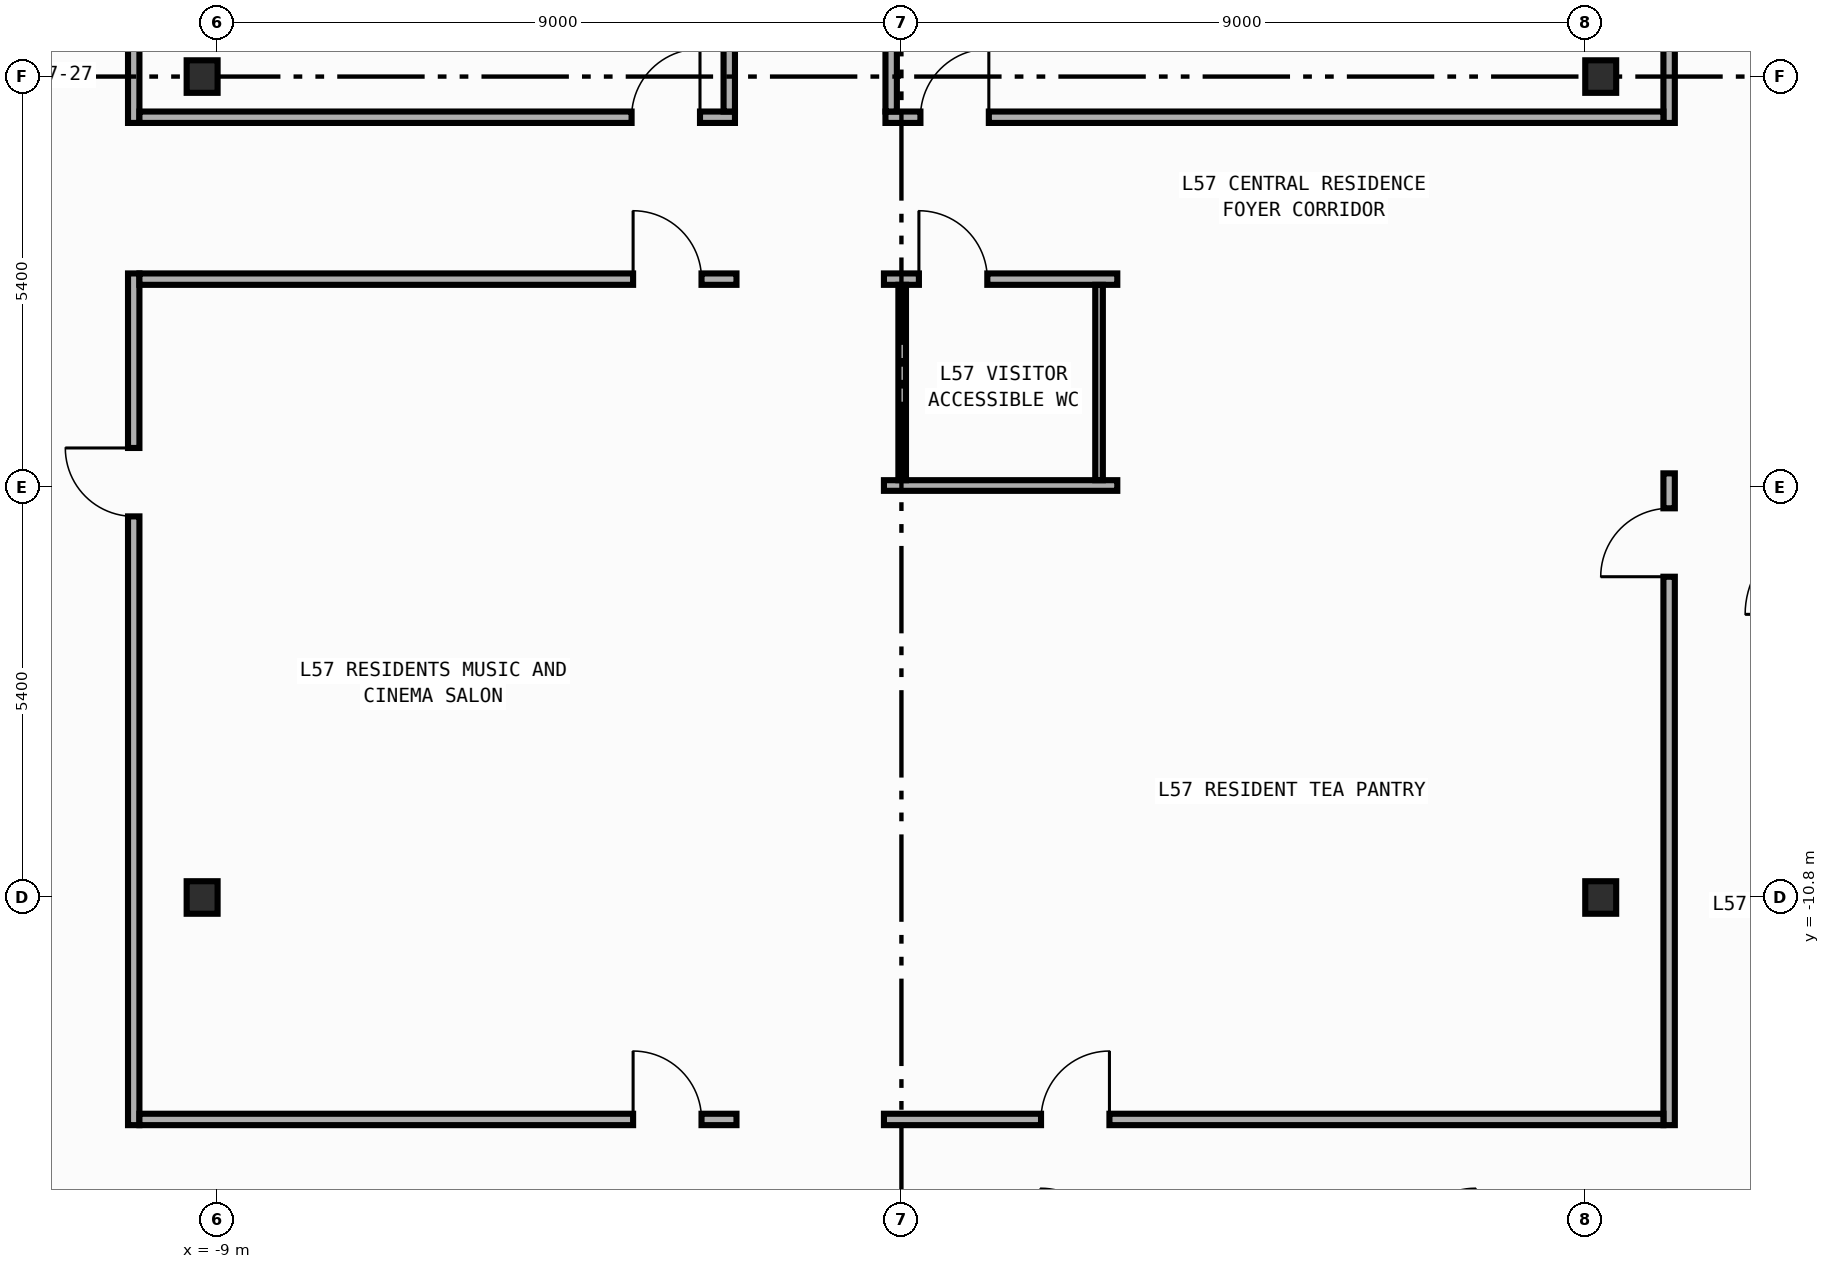
"""IFC4 building model, lengths in metres.
Left out: names, types, materials, properties, quantities, classifications, styles, units other than length and angle.
Written with IfcOpenShell. Run it as: python <this file> out.ifc"""

import sys

from ifc_helpers import new_model, si_unit, direction, frame, frame_2d, origin, origin_2d, place, context, subcontext, project, spatial, rectangle, i_section, extrude, element, fill, save


model = new_model("IFC4")
c1 = context("Model", 3, precision=1e-05, world=origin(), true_north=direction((0.0, 1.0)))
c2 = subcontext(c1, "Body", "Model", "MODEL_VIEW")
j1 = project(units=[si_unit("LENGTHUNIT", "METRE"), si_unit("PLANEANGLEUNIT", "RADIAN")], contexts=[c1])
p1 = place(None, origin())
s1 = spatial("IfcSite", under=j1, at=p1, CompositionType="ELEMENT")
p2 = place(p1, origin())
s2 = spatial("IfcBuilding", under=s1, at=p2, CompositionType="ELEMENT")
p3 = place(p2, frame((0.0, 0.0, 244.0)))
s3 = spatial("IfcBuildingStorey", under=s2, at=p3, CompositionType="ELEMENT", Elevation=244.0)
for number, where, z_axis, x_axis in (
    (1, (-9.2, -10.8, 0.0), (0.0, 0.0, 1.0), (1.0, 0.0, 0.0)),
    (2, (-9.2, 0.0, 0.0), (0.0, 0.0, 1.0), (1.0, 0.0, 0.0)),
    (3, (9.2, -10.8, 0.0), (0.0, 0.0, 1.0), (1.0, 0.0, 0.0)),
    (4, (9.2, 0.0, 0.0), (0.0, 0.0, 1.0), (1.0, 0.0, 0.0)),
):
    element("IfcColumn", number, at=place(p3, frame(where, z_axis=z_axis, x_axis=x_axis)), inside=s3, PredefinedType="COLUMN", context=c2, shape_type="SweptSolid", body=[
        extrude(i_section(OverallWidth=0.407, OverallDepth=0.428, WebThickness=0.02, FlangeThickness=0.035, FilletRadius=0.022, at=origin_2d()), origin(), (0.0, 0.0, 1.0), 3.6),
    ])
p4 = place(p3, frame((-10.1, -0.61, 0.0), z_axis=(0.0, 0.0, 1.0), x_axis=(0.0, 1.0, 0.0)))
e5 = element("IfcWall", 5, at=p4, inside=s3, PredefinedType="PARTITIONING", context=c2, shape_type="SweptSolid", body=[
    extrude(rectangle(XDim=14.405, YDim=0.15, at=frame_2d((7.203, 0.0))), origin(), (0.0, 0.0, 1.0), 3.34),
])
p5 = place(p4, frame((5.535, 0.0, 0.0)))
e6 = element("IfcOpeningElement", 6, at=p5, cuts=e5, PredefinedType="OPENING", context=c2, shape_type="SweptSolid", body=[
    extrude(rectangle(XDim=0.9, YDim=2.15, at=frame_2d((0.45, 1.075))), frame((0.0, 0.085, 0.0), z_axis=(0.0, -1.0, 0.0), x_axis=(1.0, 0.0, 0.0)), (0.0, 0.0, 1.0), 0.17),
])
p6 = place(p3, frame((-10.1, -13.795, 0.0), z_axis=(0.0, 0.0, 1.0), x_axis=(0.0, 1.0, 0.0)))
e7 = element("IfcWall", 7, at=p6, inside=s3, PredefinedType="PARTITIONING", context=c2, shape_type="SweptSolid", body=[
    extrude(rectangle(XDim=11.205, YDim=0.15, at=frame_2d((5.603, 0.0))), origin(), (0.0, 0.0, 1.0), 3.34),
])
p7 = place(p6, frame((8.009, 0.0, 0.0)))
e8 = element("IfcOpeningElement", 8, at=p7, cuts=e7, PredefinedType="OPENING", context=c2, shape_type="SweptSolid", body=[
    extrude(rectangle(XDim=0.9, YDim=2.15, at=frame_2d((0.45, 1.075))), frame((0.0, 0.085, 0.0), z_axis=(0.0, -1.0, 0.0), x_axis=(1.0, 0.0, 0.0)), (0.0, 0.0, 1.0), 0.17),
])
p8 = place(p3, frame((10.1, -0.61, 0.0), z_axis=(0.0, 0.0, 1.0), x_axis=(0.0, 1.0, 0.0)))
e9 = element("IfcWall", 9, at=p8, inside=s3, PredefinedType="PARTITIONING", context=c2, shape_type="SweptSolid", body=[
    extrude(rectangle(XDim=14.405, YDim=0.15, at=frame_2d((7.203, 0.0))), origin(), (0.0, 0.0, 1.0), 3.34),
])
p9 = place(p8, frame((5.535, 0.0, 0.0)))
e10 = element("IfcOpeningElement", 10, at=p9, cuts=e9, PredefinedType="OPENING", context=c2, shape_type="SweptSolid", body=[
    extrude(rectangle(XDim=0.9, YDim=2.15, at=frame_2d((0.45, 1.075))), frame((0.0, 0.085, 0.0), z_axis=(0.0, -1.0, 0.0), x_axis=(1.0, 0.0, 0.0)), (0.0, 0.0, 1.0), 0.17),
])
p10 = place(p3, frame((10.1, -13.795, 0.0), z_axis=(0.0, 0.0, 1.0), x_axis=(0.0, 1.0, 0.0)))
e11 = element("IfcWall", 11, at=p10, inside=s3, PredefinedType="PARTITIONING", context=c2, shape_type="SweptSolid", body=[
    extrude(rectangle(XDim=8.575, YDim=0.15, at=frame_2d((4.288, 0.0))), origin(), (0.0, 0.0, 1.0), 3.34),
])
p11 = place(p10, frame((7.215, 0.0, 0.0)))
e12 = element("IfcOpeningElement", 12, at=p11, cuts=e11, PredefinedType="OPENING", context=c2, shape_type="SweptSolid", body=[
    extrude(rectangle(XDim=0.9, YDim=2.15, at=frame_2d((0.45, 1.075))), frame((0.0, 0.085, 0.0), z_axis=(0.0, -1.0, 0.0), x_axis=(1.0, 0.0, 0.0)), (0.0, 0.0, 1.0), 0.17),
])
p12 = place(p3, frame((-10.025, -0.535, 0.0), z_axis=(0.0, 0.0, 1.0), x_axis=(1.0, 0.0, 0.0)))
e13 = element("IfcWall", 13, at=p12, inside=s3, PredefinedType="PARTITIONING", context=c2, shape_type="SweptSolid", body=[
    extrude(rectangle(XDim=7.835, YDim=0.15, at=frame_2d((3.917, 0.0))), origin(), (0.0, 0.0, 1.0), 3.34),
])
p13 = place(p12, frame((6.475, 0.0, 0.0)))
e14 = element("IfcOpeningElement", 14, at=p13, cuts=e13, PredefinedType="OPENING", context=c2, shape_type="SweptSolid", body=[
    extrude(rectangle(XDim=0.9, YDim=2.15, at=frame_2d((0.45, 1.075))), frame((0.0, 0.085, 0.0), z_axis=(0.0, -1.0, 0.0), x_axis=(1.0, 0.0, 0.0)), (0.0, 0.0, 1.0), 0.17),
])
p14 = place(p3, frame((-10.025, -2.665, 0.0), z_axis=(0.0, 0.0, 1.0), x_axis=(1.0, 0.0, 0.0)))
e15 = element("IfcWall", 15, at=p14, inside=s3, PredefinedType="PARTITIONING", context=c2, shape_type="SweptSolid", body=[
    extrude(rectangle(XDim=7.855, YDim=0.15, at=frame_2d((3.927, 0.0))), origin(), (0.0, 0.0, 1.0), 3.34),
])
p15 = place(p14, frame((6.495, 0.0, 0.0)))
e16 = element("IfcOpeningElement", 16, at=p15, cuts=e15, PredefinedType="OPENING", context=c2, shape_type="SweptSolid", body=[
    extrude(rectangle(XDim=0.9, YDim=2.15, at=frame_2d((0.45, 1.075))), frame((0.0, 0.085, 0.0), z_axis=(0.0, -1.0, 0.0), x_axis=(1.0, 0.0, 0.0)), (0.0, 0.0, 1.0), 0.17),
])
p16 = place(p3, frame((-0.21, -0.535, 0.0), z_axis=(0.0, 0.0, 1.0), x_axis=(1.0, 0.0, 0.0)))
e17 = element("IfcWall", 17, at=p16, inside=s3, PredefinedType="PARTITIONING", context=c2, shape_type="SweptSolid", body=[
    extrude(rectangle(XDim=10.235, YDim=0.15, at=frame_2d((5.117, 0.0))), origin(), (0.0, 0.0, 1.0), 3.34),
])
p17 = place(p16, frame((0.46, 0.0, 0.0)))
e18 = element("IfcOpeningElement", 18, at=p17, cuts=e17, PredefinedType="OPENING", context=c2, shape_type="SweptSolid", body=[
    extrude(rectangle(XDim=0.9, YDim=2.15, at=frame_2d((0.45, 1.075))), frame((0.0, 0.085, 0.0), z_axis=(0.0, -1.0, 0.0), x_axis=(1.0, 0.0, 0.0)), (0.0, 0.0, 1.0), 0.17),
])
p18 = place(p3, frame((-0.23, -2.665, 0.0), z_axis=(0.0, 0.0, 1.0), x_axis=(1.0, 0.0, 0.0)))
e19 = element("IfcWall", 19, at=p18, inside=s3, PredefinedType="PARTITIONING", context=c2, shape_type="SweptSolid", body=[
    extrude(rectangle(XDim=3.07, YDim=0.15, at=frame_2d((1.535, 0.0))), origin(), (0.0, 0.0, 1.0), 3.34),
])
p19 = place(p18, frame((0.46, 0.0, 0.0)))
e20 = element("IfcOpeningElement", 20, at=p19, cuts=e19, PredefinedType="OPENING", context=c2, shape_type="SweptSolid", body=[
    extrude(rectangle(XDim=0.9, YDim=2.15, at=frame_2d((0.45, 1.075))), frame((0.0, 0.085, 0.0), z_axis=(0.0, -1.0, 0.0), x_axis=(1.0, 0.0, 0.0)), (0.0, 0.0, 1.0), 0.17),
])
p20 = place(p3, frame((-2.265, -0.46, 0.0), z_axis=(0.0, 0.0, 1.0), x_axis=(0.0, 1.0, 0.0)))
e21 = element("IfcWall", 21, at=p20, inside=s3, PredefinedType="PARTITIONING", context=c2, shape_type="SweptSolid", body=[
    extrude(rectangle(XDim=14.255, YDim=0.15, at=frame_2d((7.127, 0.0))), origin(), (0.0, 0.0, 1.0), 3.34),
])
p21 = place(p20, frame((5.474, 0.0, 0.0)))
e22 = element("IfcOpeningElement", 22, at=p21, cuts=e21, PredefinedType="OPENING", context=c2, shape_type="SweptSolid", body=[
    extrude(rectangle(XDim=0.9, YDim=2.15, at=frame_2d((0.45, 1.075))), frame((0.0, 0.085, 0.0), z_axis=(0.0, -1.0, 0.0), x_axis=(1.0, 0.0, 0.0)), (0.0, 0.0, 1.0), 0.17),
])
p22 = place(p3, frame((-0.135, -0.46, 0.0), z_axis=(0.0, 0.0, 1.0), x_axis=(0.0, 1.0, 0.0)))
e23 = element("IfcWall", 23, at=p22, inside=s3, PredefinedType="PARTITIONING", context=c2, shape_type="SweptSolid", body=[
    extrude(rectangle(XDim=14.255, YDim=0.15, at=frame_2d((7.127, 0.0))), origin(), (0.0, 0.0, 1.0), 3.34),
])
p23 = place(p22, frame((5.474, 0.0, 0.0)))
e24 = element("IfcOpeningElement", 24, at=p23, cuts=e23, PredefinedType="OPENING", context=c2, shape_type="SweptSolid", body=[
    extrude(rectangle(XDim=0.9, YDim=2.15, at=frame_2d((0.45, 1.075))), frame((0.0, 0.085, 0.0), z_axis=(0.0, -1.0, 0.0), x_axis=(1.0, 0.0, 0.0)), (0.0, 0.0, 1.0), 0.17),
])
p24 = place(p3, frame((-10.025, -13.72, 0.0), z_axis=(0.0, 0.0, 1.0), x_axis=(1.0, 0.0, 0.0)))
e25 = element("IfcWall", 25, at=p24, inside=s3, PredefinedType="PARTITIONING", context=c2, shape_type="SweptSolid", body=[
    extrude(rectangle(XDim=7.855, YDim=0.15, at=frame_2d((3.927, 0.0))), origin(), (0.0, 0.0, 1.0), 3.34),
])
p25 = place(p24, frame((6.495, 0.0, 0.0)))
e26 = element("IfcOpeningElement", 26, at=p25, cuts=e25, PredefinedType="OPENING", context=c2, shape_type="SweptSolid", body=[
    extrude(rectangle(XDim=0.9, YDim=2.15, at=frame_2d((0.45, 1.075))), frame((0.0, 0.085, 0.0), z_axis=(0.0, -1.0, 0.0), x_axis=(1.0, 0.0, 0.0)), (0.0, 0.0, 1.0), 0.17),
])
p26 = place(p3, frame((-0.23, -13.72, 0.0), z_axis=(0.0, 0.0, 1.0), x_axis=(1.0, 0.0, 0.0)))
e27 = element("IfcWall", 27, at=p26, inside=s3, PredefinedType="PARTITIONING", context=c2, shape_type="SweptSolid", body=[
    extrude(rectangle(XDim=10.255, YDim=0.15, at=frame_2d((5.127, 0.0))), origin(), (0.0, 0.0, 1.0), 3.34),
])
p27 = place(p26, frame((2.067, 0.0, 0.0)))
e28 = element("IfcOpeningElement", 28, at=p27, cuts=e27, PredefinedType="OPENING", context=c2, shape_type="SweptSolid", body=[
    extrude(rectangle(XDim=0.9, YDim=2.15, at=frame_2d((0.45, 1.075))), frame((0.0, 0.085, 0.0), z_axis=(0.0, -1.0, 0.0), x_axis=(1.0, 0.0, 0.0)), (0.0, 0.0, 1.0), 0.17),
])
p28 = place(p3, frame((-0.23, -5.38, 0.0), z_axis=(0.0, 0.0, 1.0), x_axis=(1.0, 0.0, 0.0)))
e29 = element("IfcWall", 29, at=p28, inside=s3, PredefinedType="PARTITIONING", context=c2, shape_type="SweptSolid", body=[
    extrude(rectangle(XDim=3.07, YDim=0.14, at=frame_2d((1.535, 0.0))), origin(), (0.0, 0.0, 1.0), 3.34),
])
for number, where, z_axis, x_axis in (
    (30, (2.6, -2.74, 0.0), (0.0, 0.0, 1.0), (0.0, -1.0, 0.0)),
    (31, (0.01, -5.31, 0.0), (0.0, 0.0, 1.0), (0.0, 1.0, 0.0)),
):
    element("IfcWall", number, at=place(p3, frame(where, z_axis=z_axis, x_axis=x_axis)), inside=s3, PredefinedType="PARTITIONING", context=c2, shape_type="SweptSolid", body=[
        extrude(rectangle(XDim=2.57, YDim=0.1, at=frame_2d((1.285, 0.0))), origin(), (0.0, 0.0, 1.0), 3.34),
    ])
p29 = place(p7, origin())
e32 = element("IfcDoor", 32, at=p29, inside=s3, OperationType="SINGLE_SWING_RIGHT", PredefinedType="DOOR", context=c2, shape_type="SweptSolid", body=[
    extrude(rectangle(XDim=0.9, YDim=2.15, at=frame_2d((0.45, 1.075))), frame((0.0, 0.025, 0.0), z_axis=(0.0, -1.0, 0.0), x_axis=(1.0, 0.0, 0.0)), (0.0, 0.0, 1.0), 0.05),
])
fill(e8, e32)
p30 = place(p11, origin())
e33 = element("IfcDoor", 33, at=p30, inside=s3, OperationType="SINGLE_SWING_LEFT", PredefinedType="DOOR", context=c2, shape_type="SweptSolid", body=[
    extrude(rectangle(XDim=0.9, YDim=2.15, at=frame_2d((0.45, 1.075))), frame((0.0, 0.025, 0.0), z_axis=(0.0, -1.0, 0.0), x_axis=(1.0, 0.0, 0.0)), (0.0, 0.0, 1.0), 0.05),
])
fill(e12, e33)
p31 = place(p13, origin())
e34 = element("IfcDoor", 34, at=p31, inside=s3, OperationType="SINGLE_SWING_RIGHT", PredefinedType="DOOR", context=c2, shape_type="SweptSolid", body=[
    extrude(rectangle(XDim=0.9, YDim=2.15, at=frame_2d((0.45, 1.075))), frame((0.0, 0.025, 0.0), z_axis=(0.0, -1.0, 0.0), x_axis=(1.0, 0.0, 0.0)), (0.0, 0.0, 1.0), 0.05),
])
fill(e14, e34)
p32 = place(p15, origin())
e35 = element("IfcDoor", 35, at=p32, inside=s3, OperationType="SINGLE_SWING_LEFT", PredefinedType="DOOR", context=c2, shape_type="SweptSolid", body=[
    extrude(rectangle(XDim=0.9, YDim=2.15, at=frame_2d((0.45, 1.075))), frame((0.0, 0.025, 0.0), z_axis=(0.0, -1.0, 0.0), x_axis=(1.0, 0.0, 0.0)), (0.0, 0.0, 1.0), 0.05),
])
fill(e16, e35)
p33 = place(p17, origin())
e36 = element("IfcDoor", 36, at=p33, inside=s3, OperationType="SINGLE_SWING_RIGHT", PredefinedType="DOOR", context=c2, shape_type="SweptSolid", body=[
    extrude(rectangle(XDim=0.9, YDim=2.15, at=frame_2d((0.45, 1.075))), frame((0.0, 0.025, 0.0), z_axis=(0.0, -1.0, 0.0), x_axis=(1.0, 0.0, 0.0)), (0.0, 0.0, 1.0), 0.05),
])
fill(e18, e36)
p34 = place(p19, origin())
e37 = element("IfcDoor", 37, at=p34, inside=s3, OperationType="SINGLE_SWING_LEFT", PredefinedType="DOOR", context=c2, shape_type="SweptSolid", body=[
    extrude(rectangle(XDim=0.9, YDim=2.15, at=frame_2d((0.45, 1.075))), frame((0.0, 0.025, 0.0), z_axis=(0.0, -1.0, 0.0), x_axis=(1.0, 0.0, 0.0)), (0.0, 0.0, 1.0), 0.05),
])
fill(e20, e37)
p35 = place(p25, origin())
e38 = element("IfcDoor", 38, at=p35, inside=s3, OperationType="SINGLE_SWING_LEFT", PredefinedType="DOOR", context=c2, shape_type="SweptSolid", body=[
    extrude(rectangle(XDim=0.9, YDim=2.15, at=frame_2d((0.45, 1.075))), frame((0.0, 0.025, 0.0), z_axis=(0.0, -1.0, 0.0), x_axis=(1.0, 0.0, 0.0)), (0.0, 0.0, 1.0), 0.05),
])
fill(e26, e38)
p36 = place(p27, origin())
e39 = element("IfcDoor", 39, at=p36, inside=s3, OperationType="SINGLE_SWING_RIGHT", PredefinedType="DOOR", context=c2, shape_type="SweptSolid", body=[
    extrude(rectangle(XDim=0.9, YDim=2.15, at=frame_2d((0.45, 1.075))), frame((0.0, 0.025, 0.0), z_axis=(0.0, -1.0, 0.0), x_axis=(1.0, 0.0, 0.0)), (0.0, 0.0, 1.0), 0.05),
])
fill(e28, e39)
save(model, sys.argv[1])
